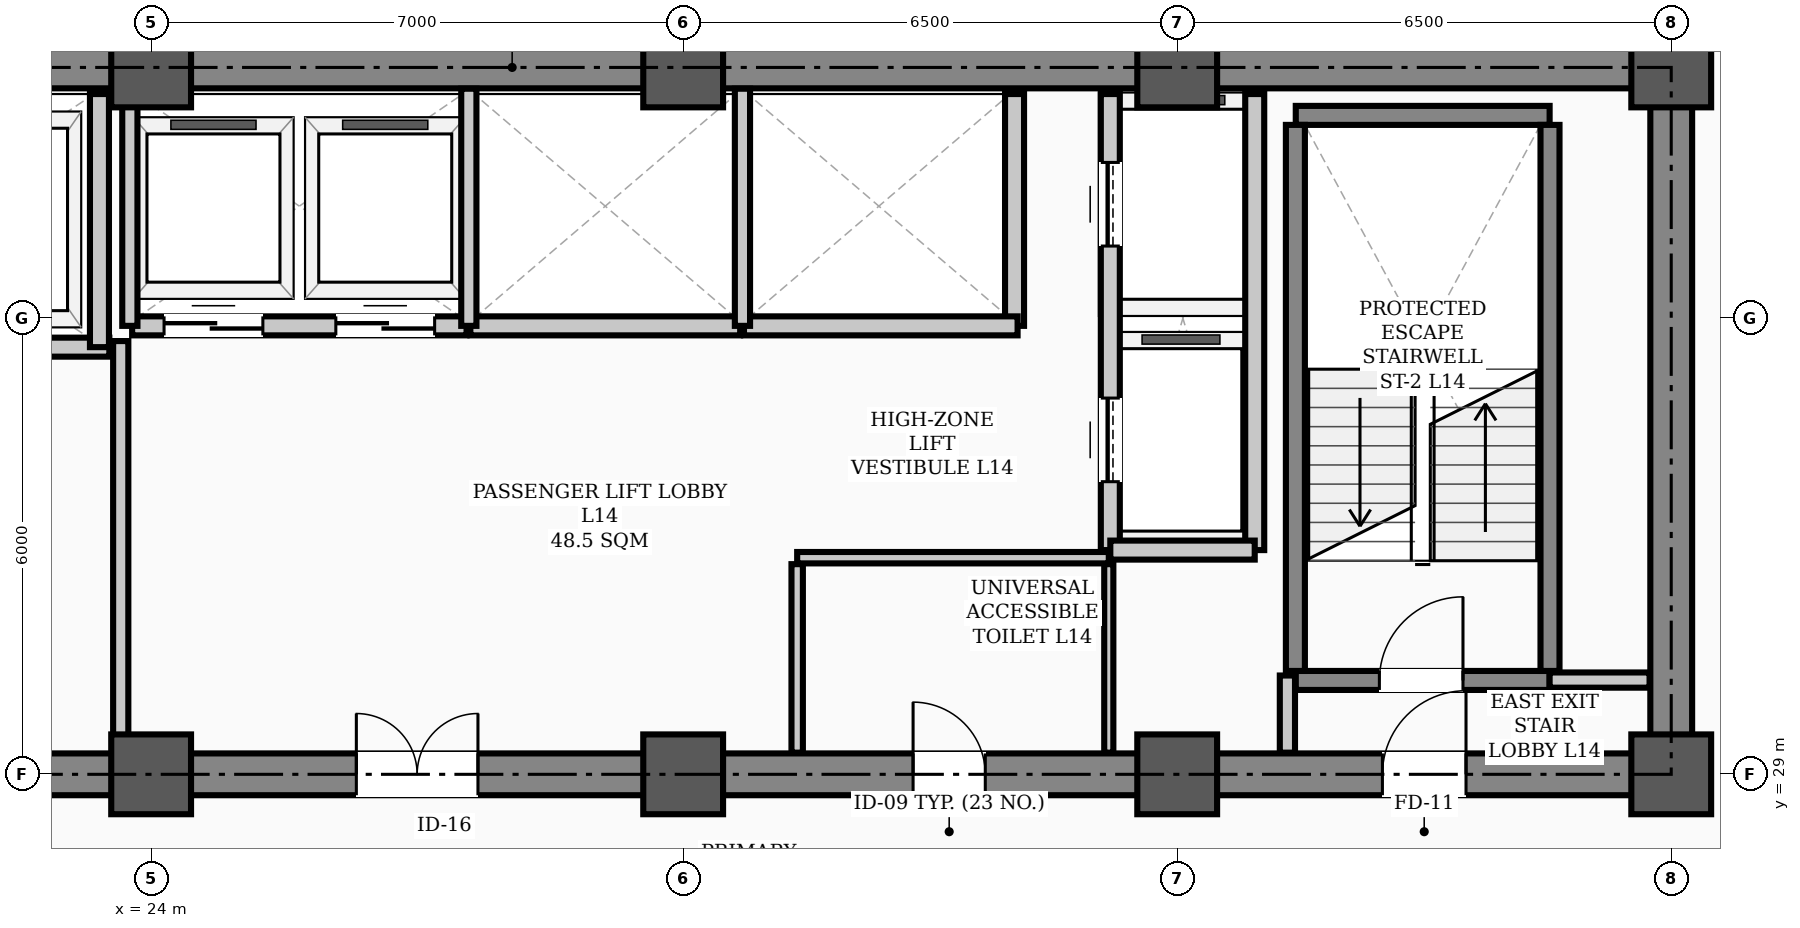
"""IFC4 building model, lengths in metres.
Left out: names, types, materials, properties, quantities, classifications, styles, units other than length and angle.
Written with IfcOpenShell. Run it as: python <this file> out.ifc"""

import sys

from ifc_helpers import new_model, si_unit, direction, frame, frame_2d, origin, origin_2d, place, context, subcontext, project, spatial, rectangle, hollow_rectangle, extrude, element, fill, save


model = new_model("IFC4")
c1 = context("Model", 3, precision=1e-05, world=origin(), true_north=direction((0.0, 1.0)))
c2 = subcontext(c1, "Body", "Model", "MODEL_VIEW")
j1 = project(units=[si_unit("LENGTHUNIT", "METRE"), si_unit("PLANEANGLEUNIT", "RADIAN")], contexts=[c1])
p1 = place(None, origin())
s1 = spatial("IfcSite", under=j1, at=p1, CompositionType="ELEMENT")
p2 = place(p1, origin())
s2 = spatial("IfcBuilding", under=s1, at=p2, CompositionType="ELEMENT")
p3 = place(p2, frame((0.0, 0.0, 57.7)))
s3 = spatial("IfcBuildingStorey", under=s2, at=p3, CompositionType="ELEMENT", Elevation=57.7)
for number, where, z_axis, x_axis in (
    (1, (24.0, 29.0, 0.0), (0.0, 0.0, 1.0), (1.0, 0.0, 0.0)),
    (2, (24.0, 38.3, 0.0), (0.0, 0.0, 1.0), (1.0, 0.0, 0.0)),
    (3, (31.0, 29.0, 0.0), (0.0, 0.0, 1.0), (1.0, 0.0, 0.0)),
    (4, (31.0, 38.3, 0.0), (0.0, 0.0, 1.0), (1.0, 0.0, 0.0)),
    (5, (37.5, 29.0, 0.0), (0.0, 0.0, 1.0), (1.0, 0.0, 0.0)),
    (6, (37.5, 38.3, 0.0), (0.0, 0.0, 1.0), (1.0, 0.0, 0.0)),
    (7, (44.0, 29.0, 0.0), (0.0, 0.0, 1.0), (1.0, 0.0, 0.0)),
    (8, (44.0, 38.3, 0.0), (0.0, 0.0, 1.0), (1.0, 0.0, 0.0)),
):
    element("IfcColumn", number, at=place(p3, frame(where, z_axis=z_axis, x_axis=x_axis)), inside=s3, PredefinedType="COLUMN", context=c2, shape_type="SweptSolid", body=[
        extrude(hollow_rectangle(XDim=1.05, YDim=1.05, WallThickness=0.038, InnerFilletRadius=0.019, OuterFilletRadius=0.057, at=origin_2d()), origin(), (0.0, 0.0, 1.0), 3.9),
    ])
p4 = place(p3, frame((13.5, 29.0, 0.0), z_axis=(0.0, 0.0, 1.0), x_axis=(1.0, 0.0, 0.0)))
e9 = element("IfcWall", 9, at=p4, inside=s3, PredefinedType="SHEAR", context=c2, shape_type="SweptSolid", body=[
    extrude(rectangle(XDim=30.5, YDim=0.55, at=frame_2d((15.25, 0.0))), origin(), (0.0, 0.0, 1.0), 3.72),
])
p5 = place(p4, frame((1.75, 0.0, 0.0)))
e10 = element("IfcOpeningElement", 10, at=p5, cuts=e9, PredefinedType="OPENING", context=c2, shape_type="SweptSolid", body=[
    extrude(rectangle(XDim=1.1, YDim=2.08, at=frame_2d((0.55, 1.04))), frame((0.0, 0.285, 0.0), z_axis=(0.0, -1.0, 0.0), x_axis=(1.0, 0.0, 0.0)), (0.0, 0.0, 1.0), 0.57),
])
p6 = place(p4, frame((26.7, 0.0, 0.0)))
e11 = element("IfcOpeningElement", 11, at=p6, cuts=e9, PredefinedType="OPENING", context=c2, shape_type="SweptSolid", body=[
    extrude(rectangle(XDim=1.1, YDim=2.08, at=frame_2d((0.55, 1.04))), frame((0.0, 0.285, 0.0), z_axis=(0.0, -1.0, 0.0), x_axis=(1.0, 0.0, 0.0)), (0.0, 0.0, 1.0), 0.57),
])
p7 = place(p4, frame((6.8, 0.0, 0.0)))
e12 = element("IfcOpeningElement", 12, at=p7, cuts=e9, PredefinedType="OPENING", context=c2, shape_type="SweptSolid", body=[
    extrude(rectangle(XDim=1.1, YDim=2.08, at=frame_2d((0.55, 1.04))), frame((0.0, 0.285, 0.0), z_axis=(0.0, -1.0, 0.0), x_axis=(1.0, 0.0, 0.0)), (0.0, 0.0, 1.0), 0.57),
])
p8 = place(p4, frame((13.2, 0.0, 0.0)))
e13 = element("IfcOpeningElement", 13, at=p8, cuts=e9, PredefinedType="OPENING", context=c2, shape_type="SweptSolid", body=[
    extrude(rectangle(XDim=1.6, YDim=2.08, at=frame_2d((0.8, 1.04))), frame((0.0, 0.285, 0.0), z_axis=(0.0, -1.0, 0.0), x_axis=(1.0, 0.0, 0.0)), (0.0, 0.0, 1.0), 0.57),
])
p9 = place(p4, frame((20.525, 0.0, 0.0)))
e14 = element("IfcOpeningElement", 14, at=p9, cuts=e9, PredefinedType="OPENING", context=c2, shape_type="SweptSolid", body=[
    extrude(rectangle(XDim=0.95, YDim=2.08, at=frame_2d((0.475, 1.04))), frame((0.0, 0.285, 0.0), z_axis=(0.0, -1.0, 0.0), x_axis=(1.0, 0.0, 0.0)), (0.0, 0.0, 1.0), 0.57),
])
p10 = place(p3, frame((13.5, 38.3, 0.0), z_axis=(0.0, 0.0, 1.0), x_axis=(1.0, 0.0, 0.0)))
e15 = element("IfcWall", 15, at=p10, inside=s3, PredefinedType="SHEAR", context=c2, shape_type="SweptSolid", body=[
    extrude(rectangle(XDim=30.5, YDim=0.55, at=frame_2d((15.25, 0.0))), origin(), (0.0, 0.0, 1.0), 3.72),
])
p11 = place(p3, frame((44.0, 29.35, 0.0), z_axis=(0.0, 0.0, 1.0), x_axis=(0.0, 1.0, 0.0)))
e16 = element("IfcWall", 16, at=p11, inside=s3, PredefinedType="SHEAR", context=c2, shape_type="SweptSolid", body=[
    extrude(rectangle(XDim=8.6, YDim=0.55, at=frame_2d((4.3, 0.0))), origin(), (0.0, 0.0, 1.0), 3.72),
])
p12 = place(p3, frame((39.06, 30.235, 0.0), z_axis=(0.0, 0.0, 1.0), x_axis=(1.0, 0.0, 0.0)))
e17 = element("IfcWall", 17, at=p12, inside=s3, PredefinedType="STANDARD", context=c2, shape_type="SweptSolid", body=[
    extrude(rectangle(XDim=3.34, YDim=0.25, at=frame_2d((1.67, 0.0))), origin(), (0.0, 0.0, 1.0), 3.72),
])
p13 = place(p12, frame((1.1, 0.0, 0.0)))
e18 = element("IfcOpeningElement", 18, at=p13, cuts=e17, PredefinedType="OPENING", context=c2, shape_type="SweptSolid", body=[
    extrude(rectangle(XDim=1.1, YDim=2.08, at=frame_2d((0.55, 1.04))), frame((0.0, 0.135, 0.0), z_axis=(0.0, -1.0, 0.0), x_axis=(1.0, 0.0, 0.0)), (0.0, 0.0, 1.0), 0.27),
])
p14 = place(p3, frame((39.06, 37.669, 0.0), z_axis=(0.0, 0.0, 1.0), x_axis=(1.0, 0.0, 0.0)))
e19 = element("IfcWall", 19, at=p14, inside=s3, PredefinedType="STANDARD", context=c2, shape_type="SweptSolid", body=[
    extrude(rectangle(XDim=3.34, YDim=0.25, at=frame_2d((1.67, 0.0))), origin(), (0.0, 0.0, 1.0), 3.72),
])
for number, where, z_axis, x_axis in (
    (20, (39.055, 30.36, 0.0), (0.0, 0.0, 1.0), (0.0, 1.0, 0.0)),
    (21, (42.405, 30.36, 0.0), (0.0, 0.0, 1.0), (0.0, 1.0, 0.0)),
):
    element("IfcWall", number, at=place(p3, frame(where, z_axis=z_axis, x_axis=x_axis)), inside=s3, PredefinedType="STANDARD", context=c2, shape_type="SweptSolid", body=[
        extrude(rectangle(XDim=7.184, YDim=0.25, at=frame_2d((3.592, 0.0))), origin(), (0.0, 0.0, 1.0), 3.72),
    ])
p15 = place(p3, frame((18.1, 34.62, 0.0), z_axis=(0.0, 0.0, 1.0), x_axis=(1.0, 0.0, 0.0)))
e22 = element("IfcWall", 22, at=p15, inside=s3, PredefinedType="STANDARD", context=c2, shape_type="SweptSolid", body=[
    extrude(rectangle(XDim=5.35, YDim=0.25, at=frame_2d((2.675, 0.0))), origin(), (0.0, 0.0, 1.0), 3.72),
])
p16 = place(p15, frame((0.85, 0.0, 0.0)))
e23 = element("IfcOpeningElement", 23, at=p16, cuts=e22, PredefinedType="OPENING", context=c2, shape_type="SweptSolid", body=[
    extrude(rectangle(XDim=1.1, YDim=2.08, at=frame_2d((0.55, 1.04))), frame((0.0, 0.135, 0.0), z_axis=(0.0, -1.0, 0.0), x_axis=(1.0, 0.0, 0.0)), (0.0, 0.0, 1.0), 0.27),
])
p17 = place(p15, frame((3.45, 0.0, 0.0)))
e24 = element("IfcOpeningElement", 24, at=p17, cuts=e22, PredefinedType="OPENING", context=c2, shape_type="SweptSolid", body=[
    extrude(rectangle(XDim=1.1, YDim=2.08, at=frame_2d((0.55, 1.04))), frame((0.0, 0.135, 0.0), z_axis=(0.0, -1.0, 0.0), x_axis=(1.0, 0.0, 0.0)), (0.0, 0.0, 1.0), 0.27),
])
p18 = place(p3, frame((36.62, 31.95, 0.0), z_axis=(0.0, 0.0, 1.0), x_axis=(0.0, 1.0, 0.0)))
e25 = element("IfcWall", 25, at=p18, inside=s3, PredefinedType="STANDARD", context=c2, shape_type="SweptSolid", body=[
    extrude(rectangle(XDim=6.0, YDim=0.25, at=frame_2d((3.0, 0.0))), origin(), (0.0, 0.0, 1.0), 3.3),
])
p19 = place(p18, frame((0.9, 0.0, 0.0)))
e26 = element("IfcOpeningElement", 26, at=p19, cuts=e25, PredefinedType="OPENING", context=c2, shape_type="SweptSolid", body=[
    extrude(rectangle(XDim=1.1, YDim=2.08, at=frame_2d((0.55, 1.04))), frame((0.0, 0.135, 0.0), z_axis=(0.0, -1.0, 0.0), x_axis=(1.0, 0.0, 0.0)), (0.0, 0.0, 1.0), 0.27),
])
p20 = place(p18, frame((4.0, 0.0, 0.0)))
e27 = element("IfcOpeningElement", 27, at=p20, cuts=e25, PredefinedType="OPENING", context=c2, shape_type="SweptSolid", body=[
    extrude(rectangle(XDim=1.1, YDim=2.08, at=frame_2d((0.55, 1.04))), frame((0.0, 0.135, 0.0), z_axis=(0.0, -1.0, 0.0), x_axis=(1.0, 0.0, 0.0)), (0.0, 0.0, 1.0), 0.27),
])
p21 = place(p3, frame((38.52, 31.95, 0.0), z_axis=(0.0, 0.0, 1.0), x_axis=(0.0, 1.0, 0.0)))
e28 = element("IfcWall", 28, at=p21, inside=s3, PredefinedType="STANDARD", context=c2, shape_type="SweptSolid", body=[
    extrude(rectangle(XDim=6.0, YDim=0.25, at=frame_2d((3.0, 0.0))), origin(), (0.0, 0.0, 1.0), 3.3),
])
p22 = place(p3, frame((36.62, 31.95, 0.0), z_axis=(0.0, 0.0, 1.0), x_axis=(1.0, 0.0, 0.0)))
e29 = element("IfcWall", 29, at=p22, inside=s3, PredefinedType="STANDARD", context=c2, shape_type="SweptSolid", body=[
    extrude(rectangle(XDim=1.9, YDim=0.25, at=frame_2d((0.95, 0.0))), origin(), (0.0, 0.0, 1.0), 3.48),
])
p23 = place(p3, frame((23.32, 34.62, 0.0), z_axis=(0.0, 0.0, 1.0), x_axis=(0.0, 1.0, 0.0)))
e30 = element("IfcWall", 30, at=p23, inside=s3, PredefinedType="STANDARD", context=c2, shape_type="SweptSolid", body=[
    extrude(rectangle(XDim=3.33, YDim=0.25, at=frame_2d((1.665, 0.0))), origin(), (0.0, 0.0, 1.0), 3.3),
])
p24 = place(p3, frame((35.36, 34.9, 0.0), z_axis=(0.0, 0.0, 1.0), x_axis=(0.0, 1.0, 0.0)))
e31 = element("IfcWall", 31, at=p24, inside=s3, PredefinedType="STANDARD", context=c2, shape_type="SweptSolid", body=[
    extrude(rectangle(XDim=3.05, YDim=0.25, at=frame_2d((1.525, 0.0))), origin(), (0.0, 0.0, 1.0), 3.3),
])
p25 = place(p3, frame((23.75, 34.9, 0.0), z_axis=(0.0, 0.0, 1.0), x_axis=(1.0, 0.0, 0.0)))
e32 = element("IfcWall", 32, at=p25, inside=s3, PredefinedType="STANDARD", context=c2, shape_type="SweptSolid", body=[
    extrude(rectangle(XDim=4.4, YDim=0.25, at=frame_2d((2.2, 0.0))), origin(), (0.0, 0.0, 1.0), 3.72),
])
p26 = place(p25, frame((0.42, 0.0, 0.0)))
e33 = element("IfcOpeningElement", 33, at=p26, cuts=e32, PredefinedType="OPENING", context=c2, shape_type="SweptSolid", body=[
    extrude(rectangle(XDim=1.3, YDim=2.08, at=frame_2d((0.65, 1.04))), frame((0.0, 0.135, 0.0), z_axis=(0.0, -1.0, 0.0), x_axis=(1.0, 0.0, 0.0)), (0.0, 0.0, 1.0), 0.27),
])
p27 = place(p25, frame((2.68, 0.0, 0.0)))
e34 = element("IfcOpeningElement", 34, at=p27, cuts=e32, PredefinedType="OPENING", context=c2, shape_type="SweptSolid", body=[
    extrude(rectangle(XDim=1.3, YDim=2.08, at=frame_2d((0.65, 1.04))), frame((0.0, 0.135, 0.0), z_axis=(0.0, -1.0, 0.0), x_axis=(1.0, 0.0, 0.0)), (0.0, 0.0, 1.0), 0.27),
])
p28 = place(p3, frame((28.2, 34.9, 0.0), z_axis=(0.0, 0.0, 1.0), x_axis=(1.0, 0.0, 0.0)))
e35 = element("IfcWall", 35, at=p28, inside=s3, PredefinedType="STANDARD", context=c2, shape_type="SweptSolid", body=[
    extrude(rectangle(XDim=3.55, YDim=0.25, at=frame_2d((1.775, 0.0))), origin(), (0.0, 0.0, 1.0), 3.72),
])
p29 = place(p3, frame((31.8, 34.9, 0.0), z_axis=(0.0, 0.0, 1.0), x_axis=(1.0, 0.0, 0.0)))
e36 = element("IfcWall", 36, at=p29, inside=s3, PredefinedType="STANDARD", context=c2, shape_type="SweptSolid", body=[
    extrude(rectangle(XDim=3.6, YDim=0.25, at=frame_2d((1.8, 0.0))), origin(), (0.0, 0.0, 1.0), 3.72),
])
p30 = place(p3, frame((42.4, 30.24, 0.0), z_axis=(0.0, 0.0, 1.0), x_axis=(1.0, 0.0, 0.0)))
e37 = element("IfcWall", 37, at=p30, inside=s3, PredefinedType="STANDARD", context=c2, shape_type="SweptSolid", body=[
    extrude(rectangle(XDim=1.315, YDim=0.2, at=frame_2d((0.658, 0.0))), origin(), (0.0, 0.0, 1.0), 3.1),
])
p31 = place(p3, frame((32.5, 31.85, 0.0), z_axis=(0.0, 0.0, 1.0), x_axis=(1.0, 0.0, 0.0)))
e38 = element("IfcWall", 38, at=p31, inside=s3, PredefinedType="PARTITIONING", context=c2, shape_type="SweptSolid", body=[
    extrude(rectangle(XDim=4.1, YDim=0.15, at=frame_2d((2.05, 0.0))), origin(), (0.0, 0.0, 1.0), 3.72),
])
p32 = place(p3, frame((38.95, 29.285, 0.0), z_axis=(0.0, 0.0, 1.0), x_axis=(0.0, 1.0, 0.0)))
e39 = element("IfcWall", 39, at=p32, inside=s3, PredefinedType="STANDARD", context=c2, shape_type="SweptSolid", body=[
    extrude(rectangle(XDim=1.015, YDim=0.2, at=frame_2d((0.508, 0.0))), origin(), (0.0, 0.0, 1.0), 3.3),
])
p33 = place(p3, frame((23.6, 29.285, 0.0), z_axis=(0.0, 0.0, 1.0), x_axis=(0.0, 1.0, 0.0)))
e40 = element("IfcWall", 40, at=p33, inside=s3, PredefinedType="STANDARD", context=c2, shape_type="SweptSolid", body=[
    extrude(rectangle(XDim=5.415, YDim=0.2, at=frame_2d((2.708, 0.0))), origin(), (0.0, 0.0, 1.0), 3.1),
])
p34 = place(p3, frame((32.5, 29.285, 0.0), z_axis=(0.0, 0.0, 1.0), x_axis=(0.0, 1.0, 0.0)))
e41 = element("IfcWall", 41, at=p34, inside=s3, PredefinedType="PARTITIONING", context=c2, shape_type="SweptSolid", body=[
    extrude(rectangle(XDim=2.48, YDim=0.15, at=frame_2d((1.24, 0.0))), origin(), (0.0, 0.0, 1.0), 3.3),
])
p35 = place(p3, frame((36.6, 29.285, 0.0), z_axis=(0.0, 0.0, 1.0), x_axis=(0.0, 1.0, 0.0)))
e42 = element("IfcWall", 42, at=p35, inside=s3, PredefinedType="PARTITIONING", context=c2, shape_type="SweptSolid", body=[
    extrude(rectangle(XDim=2.48, YDim=0.12, at=frame_2d((1.24, 0.0))), origin(), (0.0, 0.0, 1.0), 3.3),
])
p36 = place(p3, frame((23.72, 34.9, 0.0), z_axis=(0.0, 0.0, 1.0), x_axis=(0.0, 1.0, 0.0)))
e43 = element("IfcWall", 43, at=p36, inside=s3, PredefinedType="STANDARD", context=c2, shape_type="SweptSolid", body=[
    extrude(rectangle(XDim=3.12, YDim=0.2, at=frame_2d((1.56, 0.0))), origin(), (0.0, 0.0, 1.0), 3.1),
])
for number, where, z_axis, x_axis in (
    (44, (28.18, 34.9, 0.0), (0.0, 0.0, 1.0), (0.0, 1.0, 0.0)),
    (45, (31.78, 34.9, 0.0), (0.0, 0.0, 1.0), (0.0, 1.0, 0.0)),
):
    element("IfcWall", number, at=place(p3, frame(where, z_axis=z_axis, x_axis=x_axis)), inside=s3, PredefinedType="STANDARD", context=c2, shape_type="SweptSolid", body=[
        extrude(rectangle(XDim=3.12, YDim=0.2, at=frame_2d((1.56, 0.0))), origin(), (0.0, 0.0, 1.0), 3.3),
    ])
p37 = place(p13, origin())
e46 = element("IfcDoor", 46, at=p37, inside=s3, OperationType="SINGLE_SWING_RIGHT", PredefinedType="DOOR", context=c2, shape_type="SweptSolid", body=[
    extrude(rectangle(XDim=1.1, YDim=2.08, at=frame_2d((0.55, 1.04))), frame((0.0, 0.025, 0.0), z_axis=(0.0, -1.0, 0.0), x_axis=(1.0, 0.0, 0.0)), (0.0, 0.0, 1.0), 0.05),
])
fill(e18, e46)
p38 = place(p6, origin())
e47 = element("IfcDoor", 47, at=p38, inside=s3, OperationType="SINGLE_SWING_RIGHT", PredefinedType="DOOR", context=c2, shape_type="SweptSolid", body=[
    extrude(rectangle(XDim=1.1, YDim=2.08, at=frame_2d((0.55, 1.04))), frame((0.0, 0.025, 0.0), z_axis=(0.0, -1.0, 0.0), x_axis=(1.0, 0.0, 0.0)), (0.0, 0.0, 1.0), 0.05),
])
fill(e11, e47)
p39 = place(p8, origin())
e48 = element("IfcDoor", 48, at=p39, inside=s3, OperationType="DOUBLE_DOOR_SINGLE_SWING", PredefinedType="DOOR", context=c2, shape_type="SweptSolid", body=[
    extrude(rectangle(XDim=1.6, YDim=2.08, at=frame_2d((0.8, 1.04))), frame((0.0, 0.025, 0.0), z_axis=(0.0, -1.0, 0.0), x_axis=(1.0, 0.0, 0.0)), (0.0, 0.0, 1.0), 0.05),
])
fill(e13, e48)
p40 = place(p9, origin())
e49 = element("IfcDoor", 49, at=p40, inside=s3, OperationType="SINGLE_SWING_LEFT", PredefinedType="DOOR", context=c2, shape_type="SweptSolid", body=[
    extrude(rectangle(XDim=0.95, YDim=2.08, at=frame_2d((0.475, 1.04))), frame((0.0, 0.025, 0.0), z_axis=(0.0, -1.0, 0.0), x_axis=(1.0, 0.0, 0.0)), (0.0, 0.0, 1.0), 0.05),
])
fill(e14, e49)
p41 = place(p19, origin())
e50 = element("IfcDoor", 50, at=p41, inside=s3, OperationType="SLIDING_TO_LEFT", PredefinedType="DOOR", context=c2, shape_type="SweptSolid", body=[
    extrude(rectangle(XDim=1.1, YDim=2.08, at=frame_2d((0.55, 1.04))), frame((0.0, 0.025, 0.0), z_axis=(0.0, -1.0, 0.0), x_axis=(1.0, 0.0, 0.0)), (0.0, 0.0, 1.0), 0.05),
])
fill(e26, e50)
p42 = place(p20, origin())
e51 = element("IfcDoor", 51, at=p42, inside=s3, OperationType="SLIDING_TO_LEFT", PredefinedType="DOOR", context=c2, shape_type="SweptSolid", body=[
    extrude(rectangle(XDim=1.1, YDim=2.08, at=frame_2d((0.55, 1.04))), frame((0.0, 0.025, 0.0), z_axis=(0.0, -1.0, 0.0), x_axis=(1.0, 0.0, 0.0)), (0.0, 0.0, 1.0), 0.05),
])
fill(e27, e51)
p43 = place(p26, origin())
e52 = element("IfcDoor", 52, at=p43, inside=s3, OperationType="DOUBLE_DOOR_SLIDING", PredefinedType="DOOR", context=c2, shape_type="SweptSolid", body=[
    extrude(rectangle(XDim=1.3, YDim=2.08, at=frame_2d((0.65, 1.04))), frame((0.0, 0.025, 0.0), z_axis=(0.0, -1.0, 0.0), x_axis=(1.0, 0.0, 0.0)), (0.0, 0.0, 1.0), 0.05),
])
fill(e33, e52)
p44 = place(p27, origin())
e53 = element("IfcDoor", 53, at=p44, inside=s3, OperationType="DOUBLE_DOOR_SLIDING", PredefinedType="DOOR", context=c2, shape_type="SweptSolid", body=[
    extrude(rectangle(XDim=1.3, YDim=2.08, at=frame_2d((0.65, 1.04))), frame((0.0, 0.025, 0.0), z_axis=(0.0, -1.0, 0.0), x_axis=(1.0, 0.0, 0.0)), (0.0, 0.0, 1.0), 0.05),
])
fill(e34, e53)
save(model, sys.argv[1])
